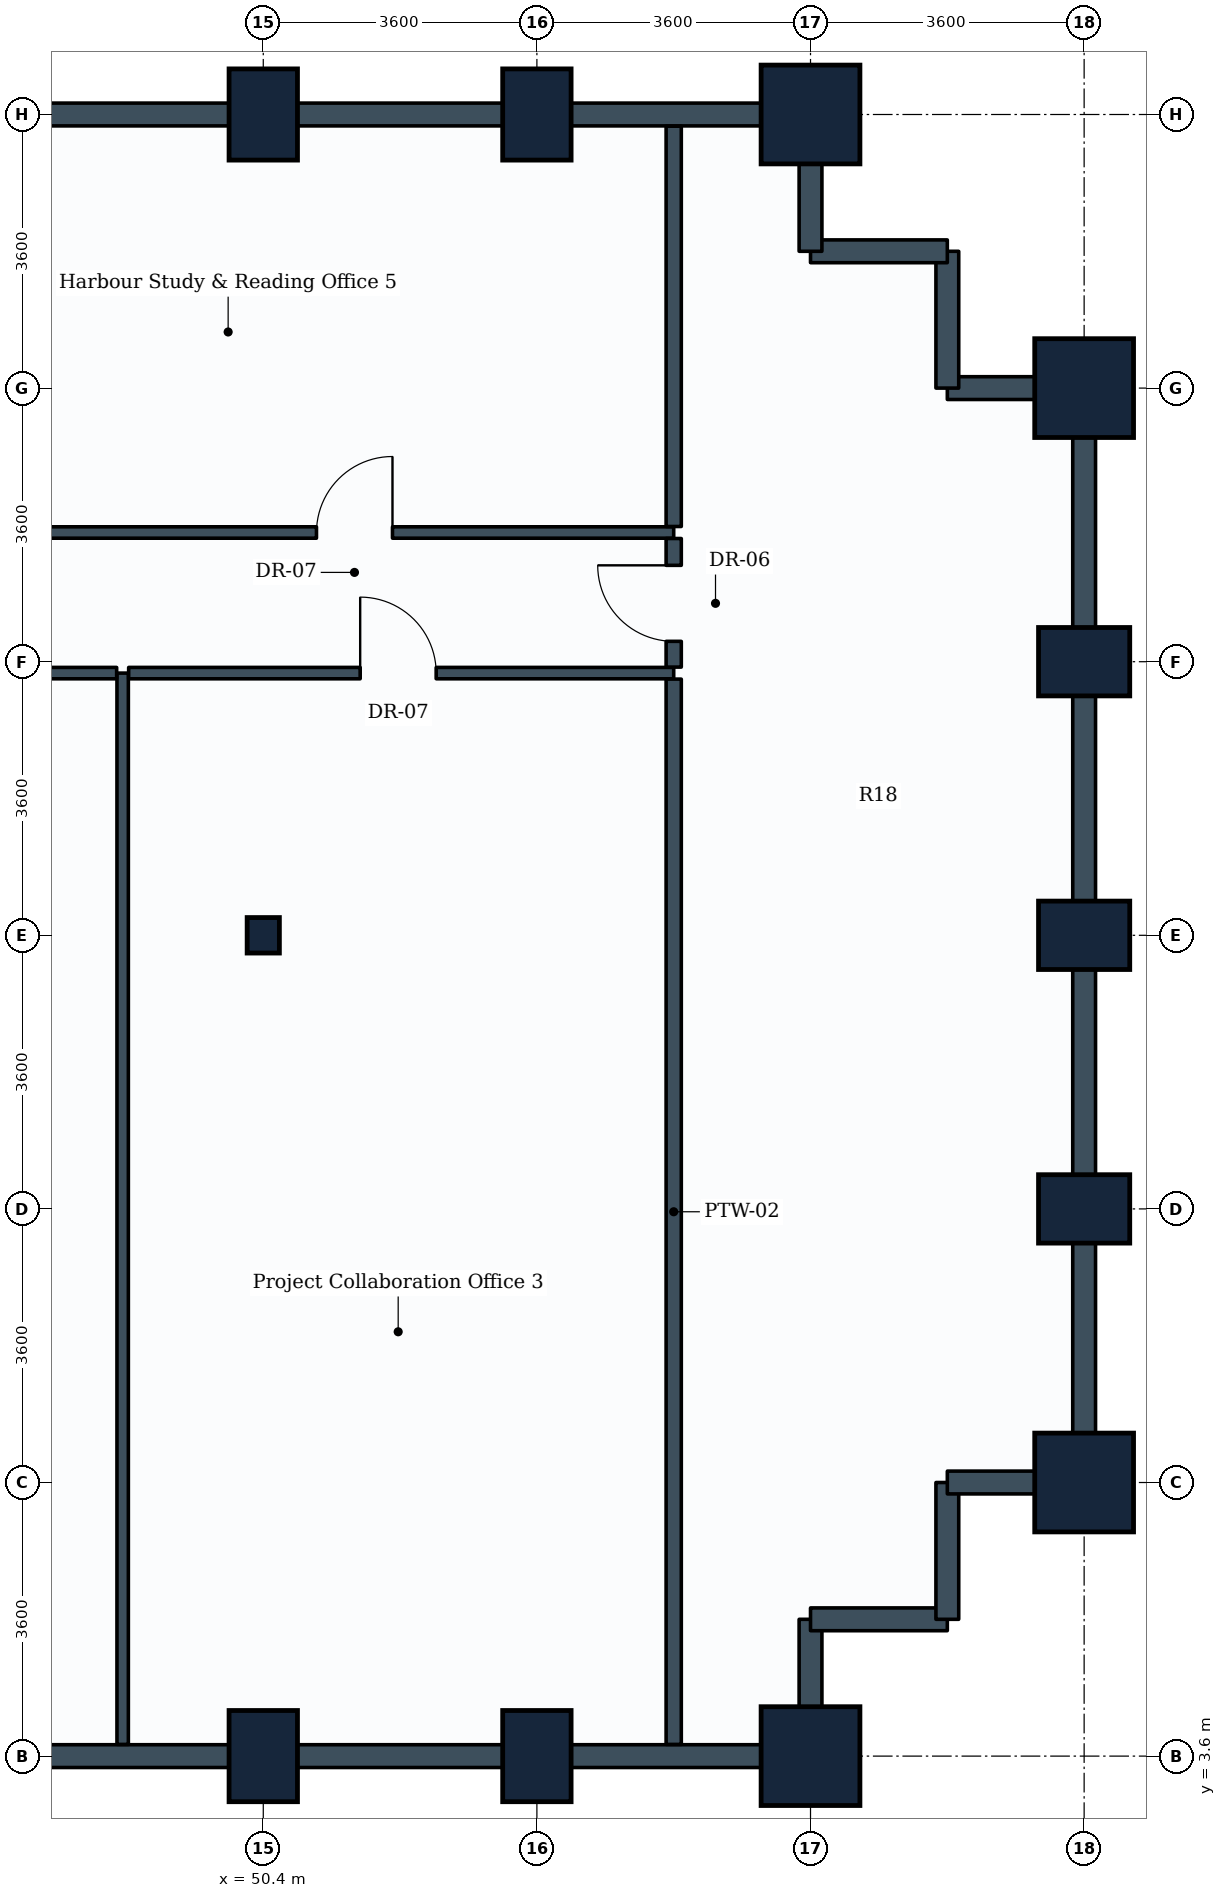
"""IFC4 building model, lengths in metres.
Left out: names, types, materials, properties, quantities, classifications, styles, units other than length and angle.
Written with IfcOpenShell. Run it as: python <this file> out.ifc"""

import sys

from ifc_helpers import new_model, si_unit, direction, frame, frame_2d, origin, origin_2d, place, context, subcontext, project, spatial, rectangle, i_section, extrude, element, fill, save


model = new_model("IFC4")
c1 = context("Model", 3, precision=1e-05, world=origin(), true_north=direction((0.0, 1.0)))
c2 = subcontext(c1, "Body", "Model", "MODEL_VIEW")
j1 = project(units=[si_unit("LENGTHUNIT", "METRE"), si_unit("PLANEANGLEUNIT", "RADIAN")], contexts=[c1])
p1 = place(None, origin())
s1 = spatial("IfcSite", under=j1, at=p1, CompositionType="ELEMENT")
p2 = place(p1, origin())
s2 = spatial("IfcBuilding", under=s1, at=p2, CompositionType="ELEMENT")
p3 = place(p2, frame((0.0, 0.0, 51.3)))
s3 = spatial("IfcBuildingStorey", under=s2, at=p3, CompositionType="ELEMENT", Elevation=51.3)
p4 = place(p3, frame((50.4, 3.6, 0.0), z_axis=(0.0, 0.0, 1.0), x_axis=(1.0, 0.0, 0.0)))
e1 = element("IfcColumn", 1, at=p4, inside=s3, PredefinedType="COLUMN", context=c2, shape_type="SweptSolid", body=[
    extrude(rectangle(XDim=0.9, YDim=1.2, at=origin_2d()), origin(), (0.0, 0.0, 1.0), 3.9),
])
p5 = place(p3, frame((50.4, 14.4, 0.0), z_axis=(0.0, 0.0, 1.0), x_axis=(1.0, 0.0, 0.0)))
e2 = element("IfcColumn", 2, at=p5, inside=s3, PredefinedType="COLUMN", context=c2, shape_type="SweptSolid", body=[
    extrude(i_section(OverallWidth=0.424, OverallDepth=0.467, WebThickness=0.033, FlangeThickness=0.053, FilletRadius=0.015, at=origin_2d()), origin(), (0.0, 0.0, 1.0), 3.9),
])
for number, where, z_axis, x_axis in (
    (3, (50.4, 25.2, 0.0), (0.0, 0.0, 1.0), (1.0, 0.0, 0.0)),
    (4, (54.0, 3.6, 0.0), (0.0, 0.0, 1.0), (1.0, 0.0, 0.0)),
    (5, (54.0, 25.2, 0.0), (0.0, 0.0, 1.0), (1.0, 0.0, 0.0)),
):
    element("IfcColumn", number, at=place(p3, frame(where, z_axis=z_axis, x_axis=x_axis)), inside=s3, PredefinedType="COLUMN", context=c2, shape_type="SweptSolid", body=[
        extrude(rectangle(XDim=0.9, YDim=1.2, at=origin_2d()), origin(), (0.0, 0.0, 1.0), 3.9),
    ])
for number, where, z_axis, x_axis in (
    (6, (57.6, 3.6, 0.0), (0.0, 0.0, 1.0), (1.0, 0.0, 0.0)),
    (7, (57.6, 25.2, 0.0), (0.0, 0.0, 1.0), (1.0, 0.0, 0.0)),
    (8, (61.2, 7.2, 0.0), (0.0, 0.0, 1.0), (1.0, 0.0, 0.0)),
):
    element("IfcColumn", number, at=place(p3, frame(where, z_axis=z_axis, x_axis=x_axis)), inside=s3, PredefinedType="COLUMN", context=c2, shape_type="SweptSolid", body=[
        extrude(rectangle(XDim=1.3, YDim=1.3, at=origin_2d()), origin(), (0.0, 0.0, 1.0), 3.9),
    ])
for number, where, z_axis, x_axis in (
    (9, (61.2, 10.8, 0.0), (0.0, 0.0, 1.0), (0.0, 1.0, 0.0)),
    (10, (61.2, 14.4, 0.0), (0.0, 0.0, 1.0), (0.0, 1.0, 0.0)),
    (11, (61.2, 18.0, 0.0), (0.0, 0.0, 1.0), (0.0, 1.0, 0.0)),
):
    element("IfcColumn", number, at=place(p3, frame(where, z_axis=z_axis, x_axis=x_axis)), inside=s3, PredefinedType="COLUMN", context=c2, shape_type="SweptSolid", body=[
        extrude(rectangle(XDim=0.9, YDim=1.2, at=origin_2d()), origin(), (0.0, 0.0, 1.0), 3.9),
    ])
p6 = place(p3, frame((61.2, 21.6, 0.0), z_axis=(0.0, 0.0, 1.0), x_axis=(0.0, 1.0, 0.0)))
e12 = element("IfcColumn", 12, at=p6, inside=s3, PredefinedType="COLUMN", context=c2, shape_type="SweptSolid", body=[
    extrude(rectangle(XDim=1.3, YDim=1.3, at=origin_2d()), origin(), (0.0, 0.0, 1.0), 3.9),
])
p7 = place(p3, frame((50.4, 3.6, 0.0), z_axis=(0.0, 0.0, 1.0), x_axis=(-1.0, 0.0, 0.0)))
e13 = element("IfcWall", 13, at=p7, inside=s3, PredefinedType="STANDARD", context=c2, shape_type="SweptSolid", body=[
    extrude(rectangle(XDim=3.6, YDim=0.3, at=frame_2d((1.8, 0.0))), origin(), (0.0, 0.0, 1.0), 2.93),
])
for number, where, z_axis, x_axis in (
    (14, (54.0, 3.6, 0.0), (0.0, 0.0, 1.0), (-1.0, 0.0, 0.0)),
    (15, (57.6, 3.6, 0.0), (0.0, 0.0, 1.0), (-1.0, 0.0, 0.0)),
):
    element("IfcWall", number, at=place(p3, frame(where, z_axis=z_axis, x_axis=x_axis)), inside=s3, PredefinedType="STANDARD", context=c2, shape_type="SweptSolid", body=[
        extrude(rectangle(XDim=3.6, YDim=0.3, at=frame_2d((1.8, 0.0))), origin(), (0.0, 0.0, 1.0), 2.93),
    ])
p8 = place(p3, frame((57.6, 5.4, 0.0), z_axis=(0.0, 0.0, 1.0), x_axis=(0.0, -1.0, 0.0)))
e16 = element("IfcWall", 16, at=p8, inside=s3, PredefinedType="STANDARD", context=c2, shape_type="SweptSolid", body=[
    extrude(rectangle(XDim=1.8, YDim=0.3, at=frame_2d((0.9, 0.0))), origin(), (0.0, 0.0, 1.0), 2.93),
])
p9 = place(p3, frame((59.4, 5.4, 0.0), z_axis=(0.0, 0.0, 1.0), x_axis=(-1.0, 0.0, 0.0)))
e17 = element("IfcWall", 17, at=p9, inside=s3, PredefinedType="STANDARD", context=c2, shape_type="SweptSolid", body=[
    extrude(rectangle(XDim=1.8, YDim=0.3, at=frame_2d((0.9, 0.0))), origin(), (0.0, 0.0, 1.0), 3.635),
])
p10 = place(p3, frame((59.4, 7.2, 0.0), z_axis=(0.0, 0.0, 1.0), x_axis=(0.0, -1.0, 0.0)))
e18 = element("IfcWall", 18, at=p10, inside=s3, PredefinedType="STANDARD", context=c2, shape_type="SweptSolid", body=[
    extrude(rectangle(XDim=1.8, YDim=0.3, at=frame_2d((0.9, 0.0))), origin(), (0.0, 0.0, 1.0), 3.635),
])
p11 = place(p3, frame((61.2, 7.2, 0.0), z_axis=(0.0, 0.0, 1.0), x_axis=(-1.0, 0.0, 0.0)))
e19 = element("IfcWall", 19, at=p11, inside=s3, PredefinedType="STANDARD", context=c2, shape_type="SweptSolid", body=[
    extrude(rectangle(XDim=1.8, YDim=0.3, at=frame_2d((0.9, 0.0))), origin(), (0.0, 0.0, 1.0), 2.93),
])
p12 = place(p3, frame((61.2, 10.8, 0.0), z_axis=(0.0, 0.0, 1.0), x_axis=(0.0, -1.0, 0.0)))
e20 = element("IfcWall", 20, at=p12, inside=s3, PredefinedType="STANDARD", context=c2, shape_type="SweptSolid", body=[
    extrude(rectangle(XDim=3.6, YDim=0.3, at=frame_2d((1.8, 0.0))), origin(), (0.0, 0.0, 1.0), 2.93),
])
p13 = place(p3, frame((61.2, 14.4, 0.0), z_axis=(0.0, 0.0, 1.0), x_axis=(0.0, -1.0, 0.0)))
e21 = element("IfcWall", 21, at=p13, inside=s3, PredefinedType="STANDARD", context=c2, shape_type="SweptSolid", body=[
    extrude(rectangle(XDim=3.6, YDim=0.3, at=frame_2d((1.8, 0.0))), origin(), (0.0, 0.0, 1.0), 2.93),
])
for number, where, z_axis, x_axis in (
    (22, (61.2, 18.0, 0.0), (0.0, 0.0, 1.0), (0.0, -1.0, 0.0)),
    (23, (61.2, 21.6, 0.0), (0.0, 0.0, 1.0), (0.0, -1.0, 0.0)),
):
    element("IfcWall", number, at=place(p3, frame(where, z_axis=z_axis, x_axis=x_axis)), inside=s3, PredefinedType="STANDARD", context=c2, shape_type="SweptSolid", body=[
        extrude(rectangle(XDim=3.6, YDim=0.3, at=frame_2d((1.8, 0.0))), origin(), (0.0, 0.0, 1.0), 2.93),
    ])
p14 = place(p3, frame((61.2, 21.6, 0.0), z_axis=(0.0, 0.0, 1.0), x_axis=(-1.0, 0.0, 0.0)))
e24 = element("IfcWall", 24, at=p14, inside=s3, PredefinedType="STANDARD", context=c2, shape_type="SweptSolid", body=[
    extrude(rectangle(XDim=1.8, YDim=0.3, at=frame_2d((0.9, 0.0))), origin(), (0.0, 0.0, 1.0), 2.93),
])
for number, where, z_axis, x_axis in (
    (25, (59.4, 23.4, 0.0), (0.0, 0.0, 1.0), (0.0, -1.0, 0.0)),
    (26, (57.6, 23.4, 0.0), (0.0, 0.0, 1.0), (1.0, 0.0, 0.0)),
):
    element("IfcWall", number, at=place(p3, frame(where, z_axis=z_axis, x_axis=x_axis)), inside=s3, PredefinedType="STANDARD", context=c2, shape_type="SweptSolid", body=[
        extrude(rectangle(XDim=1.8, YDim=0.3, at=frame_2d((0.9, 0.0))), origin(), (0.0, 0.0, 1.0), 3.635),
    ])
p15 = place(p3, frame((57.6, 25.2, 0.0), z_axis=(0.0, 0.0, 1.0), x_axis=(0.0, -1.0, 0.0)))
e27 = element("IfcWall", 27, at=p15, inside=s3, PredefinedType="STANDARD", context=c2, shape_type="SweptSolid", body=[
    extrude(rectangle(XDim=1.8, YDim=0.3, at=frame_2d((0.9, 0.0))), origin(), (0.0, 0.0, 1.0), 2.93),
])
for number, where, z_axis, x_axis in (
    (28, (54.0, 25.2, 0.0), (0.0, 0.0, 1.0), (1.0, 0.0, 0.0)),
    (29, (50.4, 25.2, 0.0), (0.0, 0.0, 1.0), (1.0, 0.0, 0.0)),
):
    element("IfcWall", number, at=place(p3, frame(where, z_axis=z_axis, x_axis=x_axis)), inside=s3, PredefinedType="STANDARD", context=c2, shape_type="SweptSolid", body=[
        extrude(rectangle(XDim=3.6, YDim=0.3, at=frame_2d((1.8, 0.0))), origin(), (0.0, 0.0, 1.0), 2.93),
    ])
p16 = place(p3, frame((46.8, 25.2, 0.0), z_axis=(0.0, 0.0, 1.0), x_axis=(1.0, 0.0, 0.0)))
e30 = element("IfcWall", 30, at=p16, inside=s3, PredefinedType="STANDARD", context=c2, shape_type="SweptSolid", body=[
    extrude(rectangle(XDim=3.6, YDim=0.3, at=frame_2d((1.8, 0.0))), origin(), (0.0, 0.0, 1.0), 2.93),
])
p17 = place(p3, frame((48.55, 3.754, 0.0), z_axis=(0.0, 0.0, 1.0), x_axis=(0.0, 1.0, 0.0)))
e31 = element("IfcWall", 31, at=p17, inside=s3, PredefinedType="PARTITIONING", context=c2, shape_type="SweptSolid", body=[
    extrude(rectangle(XDim=14.096, YDim=0.15, at=frame_2d((7.048, 0.0))), origin(), (0.0, 0.0, 1.0), 2.93),
])
p18 = place(p3, frame((41.429, 17.85, 0.0), z_axis=(0.0, 0.0, 1.0), x_axis=(1.0, 0.0, 0.0)))
e32 = element("IfcWall", 32, at=p18, inside=s3, PredefinedType="PARTITIONING", context=c2, shape_type="SweptSolid", body=[
    extrude(rectangle(XDim=7.042, YDim=0.15, at=frame_2d((3.521, 0.0))), origin(), (0.0, 0.0, 1.0), 3.03),
])
p19 = place(p18, frame((2.981, 0.0, 0.0)))
e33 = element("IfcOpeningElement", 33, at=p19, cuts=e32, PredefinedType="OPENING", context=c2, shape_type="SweptSolid", body=[
    extrude(rectangle(XDim=1.0, YDim=2.1, at=frame_2d((0.5, 1.05))), frame((0.0, 0.085, 0.0), z_axis=(0.0, -1.0, 0.0), x_axis=(1.0, 0.0, 0.0)), (0.0, 0.0, 1.0), 0.17),
])
p20 = place(p3, frame((48.629, 17.85, 0.0), z_axis=(0.0, 0.0, 1.0), x_axis=(1.0, 0.0, 0.0)))
e34 = element("IfcWall", 34, at=p20, inside=s3, PredefinedType="PARTITIONING", context=c2, shape_type="SweptSolid", body=[
    extrude(rectangle(XDim=7.171, YDim=0.15, at=frame_2d((3.585, 0.0))), origin(), (0.0, 0.0, 1.0), 3.04),
])
p21 = place(p20, frame((3.046, 0.0, 0.0)))
e35 = element("IfcOpeningElement", 35, at=p21, cuts=e34, PredefinedType="OPENING", context=c2, shape_type="SweptSolid", body=[
    extrude(rectangle(XDim=1.0, YDim=2.1, at=frame_2d((0.5, 1.05))), frame((0.0, 0.085, 0.0), z_axis=(0.0, -1.0, 0.0), x_axis=(1.0, 0.0, 0.0)), (0.0, 0.0, 1.0), 0.17),
])
p22 = place(p3, frame((47.479, 19.7, 0.0), z_axis=(0.0, 0.0, 1.0), x_axis=(1.0, 0.0, 0.0)))
e36 = element("IfcWall", 36, at=p22, inside=s3, PredefinedType="PARTITIONING", context=c2, shape_type="SweptSolid", body=[
    extrude(rectangle(XDim=8.321, YDim=0.15, at=frame_2d((4.161, 0.0))), origin(), (0.0, 0.0, 1.0), 3.04),
])
p23 = place(p22, frame((3.621, 0.0, 0.0)))
e37 = element("IfcOpeningElement", 37, at=p23, cuts=e36, PredefinedType="OPENING", context=c2, shape_type="SweptSolid", body=[
    extrude(rectangle(XDim=1.0, YDim=2.1, at=frame_2d((0.5, 1.05))), frame((0.0, 0.085, 0.0), z_axis=(0.0, -1.0, 0.0), x_axis=(1.0, 0.0, 0.0)), (0.0, 0.0, 1.0), 0.17),
])
p24 = place(p3, frame((55.8, 3.754, 0.0), z_axis=(0.0, 0.0, 1.0), x_axis=(0.0, 1.0, 0.0)))
e38 = element("IfcWall", 38, at=p24, inside=s3, PredefinedType="PARTITIONING", context=c2, shape_type="SweptSolid", body=[
    extrude(rectangle(XDim=14.017, YDim=0.2, at=frame_2d((7.009, 0.0))), origin(), (0.0, 0.0, 1.0), 2.93),
])
p25 = place(p3, frame((55.8, 19.779, 0.0), z_axis=(0.0, 0.0, 1.0), x_axis=(0.0, 1.0, 0.0)))
e39 = element("IfcWall", 39, at=p25, inside=s3, PredefinedType="PARTITIONING", context=c2, shape_type="SweptSolid", body=[
    extrude(rectangle(XDim=5.267, YDim=0.2, at=frame_2d((2.633, 0.0))), origin(), (0.0, 0.0, 1.0), 2.93),
])
p26 = place(p3, frame((55.8, 17.929, 0.0), z_axis=(0.0, 0.0, 1.0), x_axis=(0.0, 1.0, 0.0)))
e40 = element("IfcWall", 40, at=p26, inside=s3, PredefinedType="PARTITIONING", context=c2, shape_type="SweptSolid", body=[
    extrude(rectangle(XDim=1.692, YDim=0.2, at=frame_2d((0.846, 0.0))), origin(), (0.0, 0.0, 1.0), 3.635),
])
p27 = place(p26, frame((0.339, 0.0, 0.0)))
e41 = element("IfcOpeningElement", 41, at=p27, cuts=e40, PredefinedType="OPENING", context=c2, shape_type="SweptSolid", body=[
    extrude(rectangle(XDim=1.0, YDim=2.1, at=frame_2d((0.5, 1.05))), frame((0.0, 0.11, 0.0), z_axis=(0.0, -1.0, 0.0), x_axis=(1.0, 0.0, 0.0)), (0.0, 0.0, 1.0), 0.22),
])
p28 = place(p21, origin())
e42 = element("IfcDoor", 42, at=p28, inside=s3, OperationType="SINGLE_SWING_LEFT", PredefinedType="DOOR", context=c2, shape_type="SweptSolid", body=[
    extrude(rectangle(XDim=1.0, YDim=2.1, at=frame_2d((0.5, 1.05))), frame((0.0, 0.025, 0.0), z_axis=(0.0, -1.0, 0.0), x_axis=(1.0, 0.0, 0.0)), (0.0, 0.0, 1.0), 0.05),
])
fill(e35, e42)
p29 = place(p23, origin())
e43 = element("IfcDoor", 43, at=p29, inside=s3, OperationType="SINGLE_SWING_RIGHT", PredefinedType="DOOR", context=c2, shape_type="SweptSolid", body=[
    extrude(rectangle(XDim=1.0, YDim=2.1, at=frame_2d((0.5, 1.05))), frame((0.0, 0.025, 0.0), z_axis=(0.0, -1.0, 0.0), x_axis=(1.0, 0.0, 0.0)), (0.0, 0.0, 1.0), 0.05),
])
fill(e37, e43)
p30 = place(p27, origin())
e44 = element("IfcDoor", 44, at=p30, inside=s3, OperationType="SINGLE_SWING_RIGHT", PredefinedType="DOOR", context=c2, shape_type="SweptSolid", body=[
    extrude(rectangle(XDim=1.0, YDim=2.1, at=frame_2d((0.5, 1.05))), frame((0.0, 0.025, 0.0), z_axis=(0.0, -1.0, 0.0), x_axis=(1.0, 0.0, 0.0)), (0.0, 0.0, 1.0), 0.05),
])
fill(e41, e44)
save(model, sys.argv[1])
